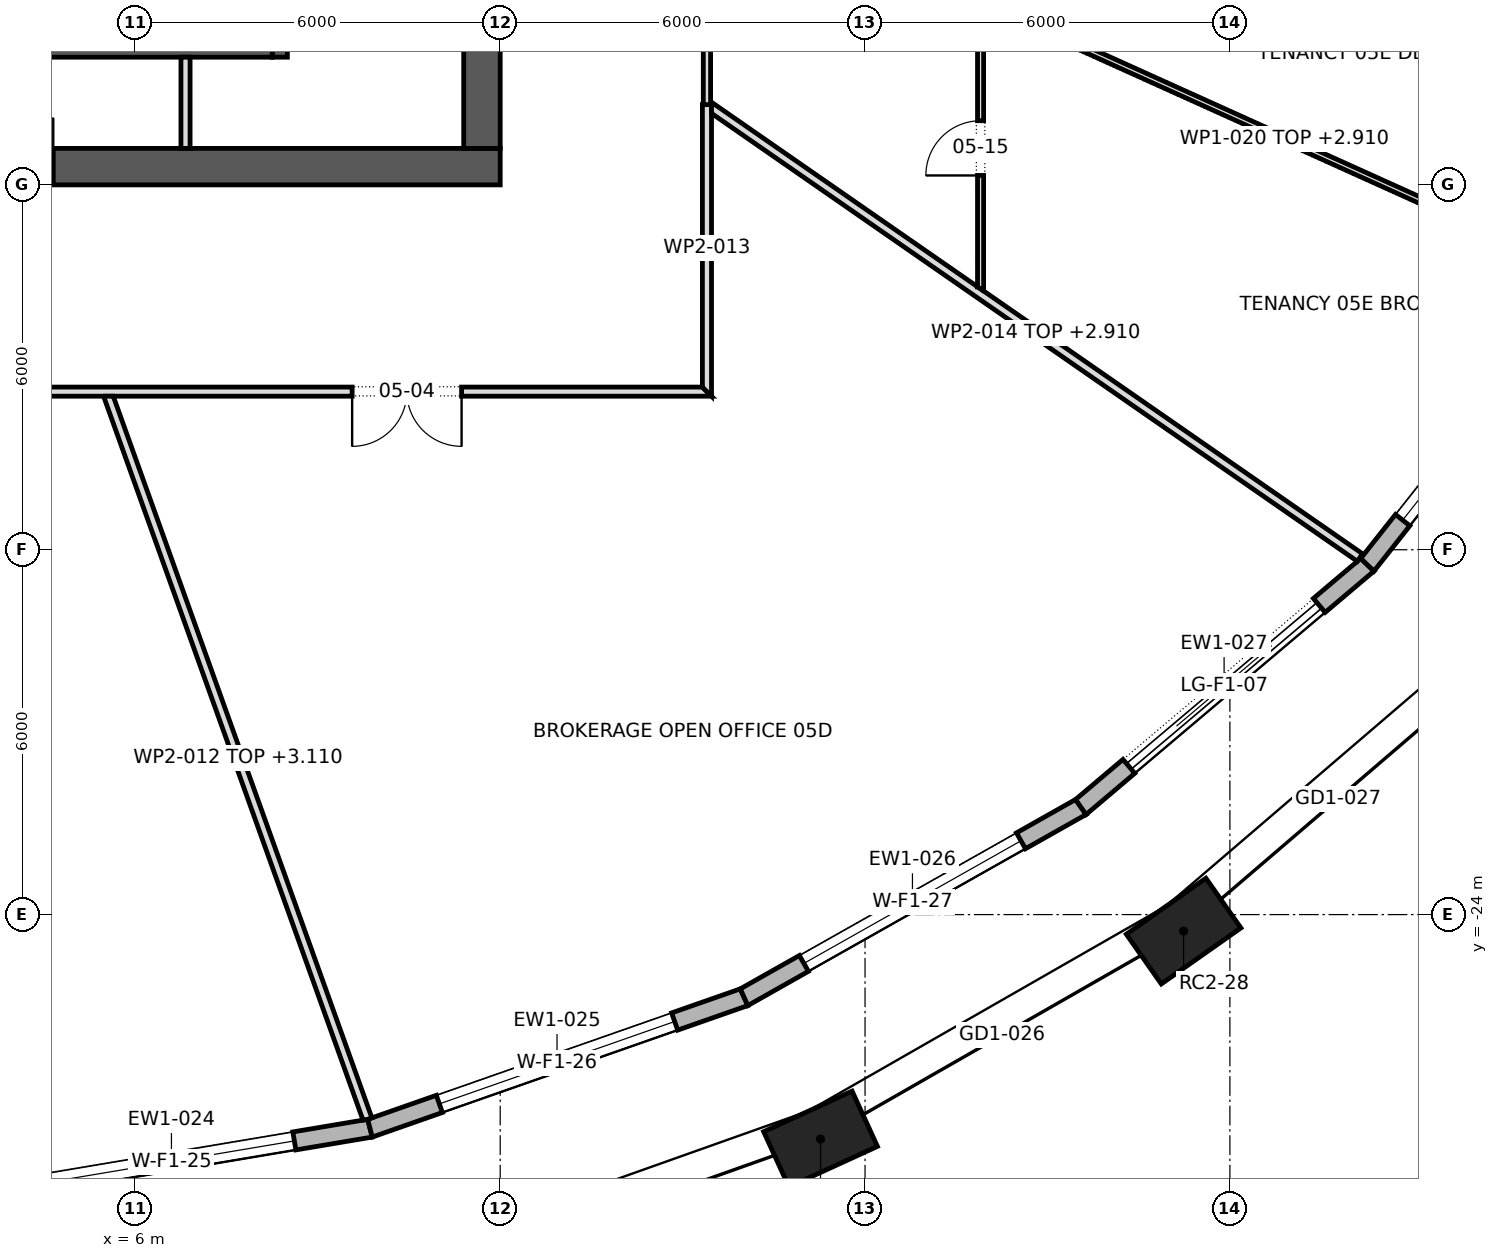
"""IFC4 building model, lengths in metres.
Left out: names, types, materials, properties, quantities, classifications, styles, units other than length and angle.
Written with IfcOpenShell. Run it as: python <this file> out.ifc"""

import sys

from ifc_helpers import new_model, si_unit, direction, frame, frame_2d, origin, origin_2d, place, context, subcontext, project, spatial, polyline, rectangle, outline, extrude, element, fill, save


model = new_model("IFC4")
c1 = context("Model", 3, precision=1e-05, world=origin(), true_north=direction((0.0, 1.0)))
c2 = subcontext(c1, "Body", "Model", "MODEL_VIEW")
j1 = project(units=[si_unit("LENGTHUNIT", "METRE"), si_unit("PLANEANGLEUNIT", "RADIAN")], contexts=[c1])
p1 = place(None, origin())
s1 = spatial("IfcSite", under=j1, at=p1, CompositionType="ELEMENT")
p2 = place(p1, origin())
s2 = spatial("IfcBuilding", under=s1, at=p2, CompositionType="ELEMENT")
p3 = place(p2, frame((0.0, 0.0, 73.9)))
s3 = spatial("IfcBuildingStorey", under=s2, at=p3, CompositionType="ELEMENT", Elevation=73.9)
for number, where, z_axis, x_axis in (
    (1, (17.268, -27.691, 0.0), (0.0, 0.0, 1.0), (0.909, 0.417, 0.0)),
    (2, (23.239, -24.271, 0.0), (0.0, 0.0, 1.0), (0.818, 0.575, 0.0)),
):
    element("IfcColumn", number, at=place(p3, frame(where, z_axis=z_axis, x_axis=x_axis)), inside=s3, PredefinedType="COLUMN", context=c2, shape_type="SweptSolid", body=[
        extrude(rectangle(XDim=1.6, YDim=1.0, at=origin_2d()), origin(), (0.0, 0.0, 1.0), 4.2),
    ])
p4 = place(p3, frame((-12.0, -11.7, 0.0), z_axis=(0.0, 0.0, 1.0), x_axis=(1.0, 0.0, 0.0)))
e3 = element("IfcWall", 3, at=p4, inside=s3, PredefinedType="SHEAR", context=c2, shape_type="SweptSolid", body=[
    extrude(rectangle(XDim=24.0, YDim=0.6, at=frame_2d((12.0, 0.0))), origin(), (0.0, 0.0, 1.0), 4.2),
])
p5 = place(p4, frame((9.975, 0.0, 0.0)))
e4 = element("IfcOpeningElement", 4, at=p5, cuts=e3, PredefinedType="OPENING", context=c2, shape_type="SweptSolid", body=[
    extrude(rectangle(XDim=0.9, YDim=2.1, at=frame_2d((0.45, 1.05))), frame((0.0, 0.312, 0.0), z_axis=(0.0, -1.0, 0.0), x_axis=(1.0, 0.0, 0.0)), (0.0, 0.0, 1.0), 0.624),
])
p6 = place(p4, frame((4.6, 0.0, 0.0)))
e5 = element("IfcOpeningElement", 5, at=p6, cuts=e3, PredefinedType="OPENING", context=c2, shape_type="SweptSolid", body=[
    extrude(rectangle(XDim=0.8, YDim=2.1, at=frame_2d((0.4, 1.05))), frame((0.0, 0.312, 0.0), z_axis=(0.0, -1.0, 0.0), x_axis=(1.0, 0.0, 0.0)), (0.0, 0.0, 1.0), 0.624),
])
p7 = place(p4, frame((7.0, 0.0, 0.0)))
e6 = element("IfcOpeningElement", 6, at=p7, cuts=e3, PredefinedType="OPENING", context=c2, shape_type="SweptSolid", body=[
    extrude(rectangle(XDim=0.8, YDim=2.1, at=frame_2d((0.4, 1.05))), frame((0.0, 0.312, 0.0), z_axis=(0.0, -1.0, 0.0), x_axis=(1.0, 0.0, 0.0)), (0.0, 0.0, 1.0), 0.624),
])
p8 = place(p4, frame((15.85, 0.0, 0.0)))
e7 = element("IfcOpeningElement", 7, at=p8, cuts=e3, PredefinedType="OPENING", context=c2, shape_type="SweptSolid", body=[
    extrude(rectangle(XDim=0.8, YDim=2.1, at=frame_2d((0.4, 1.05))), frame((0.0, 0.312, 0.0), z_axis=(0.0, -1.0, 0.0), x_axis=(1.0, 0.0, 0.0)), (0.0, 0.0, 1.0), 0.624),
])
p9 = place(p3, frame((11.7, -11.4, 0.0), z_axis=(0.0, 0.0, 1.0), x_axis=(0.0, 1.0, 0.0)))
e8 = element("IfcWall", 8, at=p9, inside=s3, PredefinedType="SHEAR", context=c2, shape_type="SweptSolid", body=[
    extrude(rectangle(XDim=22.8, YDim=0.6, at=frame_2d((11.4, 0.0))), origin(), (0.0, 0.0, 1.0), 4.2),
])
p10 = place(p9, frame((10.2, 0.0, 0.0)))
e9 = element("IfcOpeningElement", 9, at=p10, cuts=e8, PredefinedType="OPENING", context=c2, shape_type="SweptSolid", body=[
    extrude(rectangle(XDim=2.4, YDim=2.1, at=frame_2d((1.2, 1.05))), frame((0.0, 0.312, 0.0), z_axis=(0.0, -1.0, 0.0), x_axis=(1.0, 0.0, 0.0)), (0.0, 0.0, 1.0), 0.624),
])
p11 = place(p9, frame((19.5, 0.0, 0.0)))
e10 = element("IfcOpeningElement", 10, at=p11, cuts=e8, PredefinedType="OPENING", context=c2, shape_type="SweptSolid", body=[
    extrude(rectangle(XDim=1.2, YDim=2.1, at=frame_2d((0.6, 1.05))), frame((0.0, 0.312, 0.0), z_axis=(0.0, -1.0, 0.0), x_axis=(1.0, 0.0, 0.0)), (0.0, 0.0, 1.0), 0.624),
])
p12 = place(p9, frame((2.1, 0.0, 0.0)))
e11 = element("IfcOpeningElement", 11, at=p12, cuts=e8, PredefinedType="OPENING", context=c2, shape_type="SweptSolid", body=[
    extrude(rectangle(XDim=1.2, YDim=2.1, at=frame_2d((0.6, 1.05))), frame((0.0, 0.312, 0.0), z_axis=(0.0, -1.0, 0.0), x_axis=(1.0, 0.0, 0.0)), (0.0, 0.0, 1.0), 0.624),
])
p13 = place(p3, frame((3.329, -28.611, 0.0), z_axis=(0.0, 0.0, 1.0), x_axis=(0.986157735925, 0.165809890767, 0.0)))
e12 = element("IfcWall", 12, at=p13, inside=s3, PredefinedType="STANDARD", context=c2, shape_type="SweptSolid", body=[
    extrude(outline(polyline([(-0.012, -0.15), (6.634, -0.15), (6.609, 0.15), (0.012, 0.15), (-0.012, -0.15)])), origin(), (0.0, 0.0, 1.0), 3.9),
])
p14 = place(p13, frame((1.261, 0.0, 0.6)))
e13 = element("IfcOpeningElement", 13, at=p14, cuts=e12, PredefinedType="OPENING", context=c2, shape_type="SweptSolid", body=[
    extrude(rectangle(XDim=4.1, YDim=2.85, at=frame_2d((2.05, 1.425))), frame((0.0, 0.162, 0.0), z_axis=(0.0, -1.0, 0.0), x_axis=(1.0, 0.0, 0.0)), (0.0, 0.0, 1.0), 0.324),
])
p15 = place(p3, frame((9.858, -27.513, 0.0), z_axis=(0.0, 0.0, 1.0), x_axis=(0.943815136299, 0.330473884736, 0.0)))
e14 = element("IfcWall", 14, at=p15, inside=s3, PredefinedType="STANDARD", context=c2, shape_type="SweptSolid", body=[
    extrude(outline(polyline([(-0.013, -0.15), (6.531, -0.15), (6.505, 0.15), (0.013, 0.15), (-0.013, -0.15)])), origin(), (0.0, 0.0, 1.0), 3.9),
])
p16 = place(p15, frame((1.209, 0.0, 0.6)))
e15 = element("IfcOpeningElement", 15, at=p16, cuts=e14, PredefinedType="OPENING", context=c2, shape_type="SweptSolid", body=[
    extrude(rectangle(XDim=4.1, YDim=2.85, at=frame_2d((2.05, 1.425))), frame((0.0, 0.162, 0.0), z_axis=(0.0, -1.0, 0.0), x_axis=(1.0, 0.0, 0.0)), (0.0, 0.0, 1.0), 0.324),
])
p17 = place(p3, frame((16.01, -25.359, 0.0), z_axis=(0.0, 0.0, 1.0), x_axis=(0.870710061474, 0.491796694629, 0.0)))
e16 = element("IfcWall", 16, at=p17, inside=s3, PredefinedType="STANDARD", context=c2, shape_type="SweptSolid", body=[
    extrude(outline(polyline([(-0.013, -0.15), (6.375, -0.15), (6.346, 0.15), (0.013, 0.15), (-0.013, -0.15)])), origin(), (0.0, 0.0, 1.0), 3.9),
])
p18 = place(p17, frame((1.13, 0.0, 0.6)))
e17 = element("IfcOpeningElement", 17, at=p18, cuts=e16, PredefinedType="OPENING", context=c2, shape_type="SweptSolid", body=[
    extrude(rectangle(XDim=4.1, YDim=2.85, at=frame_2d((2.05, 1.425))), frame((0.0, 0.162, 0.0), z_axis=(0.0, -1.0, 0.0), x_axis=(1.0, 0.0, 0.0)), (0.0, 0.0, 1.0), 0.324),
])
p19 = place(p3, frame((21.549, -22.231, 0.0), z_axis=(0.0, 0.0, 1.0), x_axis=(0.763693886759, 0.645578536916, 0.0)))
e18 = element("IfcWall", 18, at=p19, inside=s3, PredefinedType="STANDARD", context=c2, shape_type="SweptSolid", body=[
    extrude(outline(polyline([(-0.014, -0.15), (6.185, -0.15), (6.155, 0.15), (0.014, 0.15), (-0.014, -0.15)])), origin(), (0.0, 0.0, 1.0), 3.9),
])
p20 = place(p19, frame((1.035, 0.0, 0.0)))
e19 = element("IfcOpeningElement", 19, at=p20, cuts=e18, PredefinedType="OPENING", context=c2, shape_type="SweptSolid", body=[
    extrude(rectangle(XDim=4.1, YDim=3.45, at=frame_2d((2.05, 1.725))), frame((0.0, 0.162, 0.0), z_axis=(0.0, -1.0, 0.0), x_axis=(1.0, 0.0, 0.0)), (0.0, 0.0, 1.0), 0.324),
])
p21 = place(p3, frame((26.26, -18.248, 0.0), z_axis=(0.0, 0.0, 1.0), x_axis=(0.620093447965, 0.784527957303, 0.0)))
e20 = element("IfcWall", 20, at=p21, inside=s3, PredefinedType="STANDARD", context=c2, shape_type="SweptSolid", body=[
    extrude(outline(polyline([(-0.015, -0.15), (5.989, -0.15), (5.957, 0.15), (0.015, 0.15), (-0.015, -0.15)])), origin(), (0.0, 0.0, 1.0), 3.9),
])
p22 = place(p21, frame((0.937, 0.0, 0.6)))
e21 = element("IfcOpeningElement", 21, at=p22, cuts=e20, PredefinedType="OPENING", context=c2, shape_type="SweptSolid", body=[
    extrude(rectangle(XDim=4.1, YDim=2.85, at=frame_2d((2.05, 1.425))), frame((0.0, 0.162, 0.0), z_axis=(0.0, -1.0, 0.0), x_axis=(1.0, 0.0, 0.0)), (0.0, 0.0, 1.0), 0.324),
])
p23 = place(p3, frame((8.375, -9.9, 0.0), z_axis=(0.0, 0.0, 1.0), x_axis=(0.0, 1.0, 0.0)))
e22 = element("IfcWall", 22, at=p23, inside=s3, PredefinedType="SHEAR", context=c2, shape_type="SweptSolid", body=[
    extrude(rectangle(XDim=3.4, YDim=0.25, at=frame_2d((1.7, 0.0))), origin(), (0.0, 0.0, 1.0), 3.9),
])
p24 = place(p23, frame((1.175, 0.0, 0.0)))
e23 = element("IfcOpeningElement", 23, at=p24, cuts=e22, PredefinedType="OPENING", context=c2, shape_type="SweptSolid", body=[
    extrude(rectangle(XDim=1.2, YDim=2.1, at=frame_2d((0.6, 1.05))), frame((0.0, 0.137, 0.0), z_axis=(0.0, -1.0, 0.0), x_axis=(1.0, 0.0, 0.0)), (0.0, 0.0, 1.0), 0.274),
])
p25 = place(p3, frame((0.25, -9.825, 0.0), z_axis=(0.0, 0.0, 1.0), x_axis=(1.0, 0.0, 0.0)))
e24 = element("IfcWall", 24, at=p25, inside=s3, PredefinedType="SHEAR", context=c2, shape_type="SweptSolid", body=[
    extrude(rectangle(XDim=8.0, YDim=0.15, at=frame_2d((4.0, 0.0))), origin(), (0.0, 0.0, 1.0), 3.9),
])
p26 = place(p3, frame((6.825, -11.4, 0.0), z_axis=(0.0, 0.0, 1.0), x_axis=(0.0, 1.0, 0.0)))
e25 = element("IfcWall", 25, at=p26, inside=s3, PredefinedType="PARTITIONING", context=c2, shape_type="SweptSolid", body=[
    extrude(rectangle(XDim=1.5, YDim=0.15, at=frame_2d((0.75, 0.0))), origin(), (0.0, 0.0, 1.0), 3.9),
])
p27 = place(p3, frame((-15.475, -15.4, 0.0), z_axis=(0.0, 0.0, 1.0), x_axis=(1.0, 0.0, 0.0)))
e26 = element("IfcWall", 26, at=p27, inside=s3, PredefinedType="PARTITIONING", context=c2, shape_type="SweptSolid", body=[
    extrude(outline(polyline([(0.0, -0.075), (1.935, -0.075), (3.869, -0.075), (5.803, -0.075), (7.738, -0.075), (9.672, -0.075), (11.606, -0.075), (13.541, -0.075), (15.475, -0.075), (17.409, -0.075), (19.344, -0.075), (21.278, -0.075), (23.212, -0.075), (25.147, -0.075), (27.081, -0.075), (29.016, -0.075), (30.95, -0.075), (30.8, 0.075), (28.885, 0.075), (26.969, 0.075), (25.053, 0.075), (23.138, 0.075), (21.222, 0.075), (19.306, 0.075), (17.391, 0.075), (15.475, 0.075), (13.56, 0.075), (11.644, 0.075), (9.728, 0.075), (7.812, 0.075), (5.897, 0.075), (3.981, 0.075), (2.066, 0.075), (0.15, 0.075), (0.0, -0.075)])), origin(), (0.0, 0.0, 1.0), 3.9),
])
p28 = place(p27, frame((2.405, 0.0, 0.0)))
e27 = element("IfcOpeningElement", 27, at=p28, cuts=e26, PredefinedType="OPENING", context=c2, shape_type="SweptSolid", body=[
    extrude(rectangle(XDim=1.0, YDim=2.1, at=frame_2d((0.5, 1.05))), frame((0.0, 0.087, 0.0), z_axis=(0.0, -1.0, 0.0), x_axis=(1.0, 0.0, 0.0)), (0.0, 0.0, 1.0), 0.174),
])
p29 = place(p27, frame((12.47, 0.0, 0.0)))
e28 = element("IfcOpeningElement", 28, at=p29, cuts=e26, PredefinedType="OPENING", context=c2, shape_type="SweptSolid", body=[
    extrude(rectangle(XDim=1.8, YDim=2.1, at=frame_2d((0.9, 1.05))), frame((0.0, 0.087, 0.0), z_axis=(0.0, -1.0, 0.0), x_axis=(1.0, 0.0, 0.0)), (0.0, 0.0, 1.0), 0.174),
])
p30 = place(p27, frame((25.04, 0.0, 0.0)))
e29 = element("IfcOpeningElement", 29, at=p30, cuts=e26, PredefinedType="OPENING", context=c2, shape_type="SweptSolid", body=[
    extrude(rectangle(XDim=1.8, YDim=2.1, at=frame_2d((0.9, 1.05))), frame((0.0, 0.087, 0.0), z_axis=(0.0, -1.0, 0.0), x_axis=(1.0, 0.0, 0.0)), (0.0, 0.0, 1.0), 0.174),
])
p31 = place(p3, frame((5.548, -15.45, 0.0), z_axis=(0.0, 0.0, 1.0), x_axis=(0.337357475529, -0.941376616294, 0.0)))
e30 = element("IfcWall", 30, at=p31, inside=s3, PredefinedType="PARTITIONING", context=c2, shape_type="SweptSolid", body=[
    extrude(outline(polyline([(0.0, -0.075), (1.807, -0.075), (3.613, -0.075), (5.42, -0.075), (7.226, -0.075), (9.033, -0.075), (10.84, -0.075), (12.646, -0.075), (12.66, 0.002), (12.66, 0.018), (12.66, 0.075), (10.859, 0.075), (9.058, 0.075), (7.257, 0.075), (5.456, 0.075), (3.655, 0.075), (1.854, 0.075), (0.053, 0.075), (0.0, -0.074), (0.0, -0.075)])), origin(), (0.0, 0.0, 1.0), 3.11),
])
p32 = place(p3, frame((15.4, -10.68, 0.0), z_axis=(0.0, 0.0, 1.0), x_axis=(0.0, -1.0, 0.0)))
e31 = element("IfcWall", 31, at=p32, inside=s3, PredefinedType="PARTITIONING", context=c2, shape_type="SweptSolid", body=[
    extrude(outline(polyline([(0.0, -0.075), (1.548, -0.075), (3.097, -0.075), (4.645, -0.075), (4.795, 0.075), (3.197, 0.075), (1.598, 0.075), (0.0, 0.075), (0.0, -0.075)])), origin(), (0.0, 0.0, 1.0), 3.9),
])
p33 = place(p3, frame((15.418, -10.692, 0.0), z_axis=(0.0, 0.0, 1.0), x_axis=(0.821683258501, -0.569944403166, 0.0)))
e32 = element("IfcWall", 32, at=p33, inside=s3, PredefinedType="PARTITIONING", context=c2, shape_type="SweptSolid", body=[
    extrude(outline(polyline([(13.047, 0.075), (11.122, 0.075), (9.196, 0.075), (7.271, 0.075), (5.346, 0.075), (5.343, 0.073), (5.342, 0.075), (3.562, 0.075), (1.781, 0.075), (0.0, 0.075), (0.0, 0.074), (0.028, 0.034), (0.04, 0.043), (0.122, -0.075), (1.968, -0.075), (3.815, -0.075), (5.661, -0.075), (7.508, -0.075), (9.354, -0.075), (11.2, -0.075), (13.047, -0.075), (13.047, 0.075)])), origin(), (0.0, 0.0, 1.0), 2.91),
])
p34 = place(p3, frame((15.4, -3.89, 0.0), z_axis=(0.0, 0.0, 1.0), x_axis=(0.0, -1.0, 0.0)))
e33 = element("IfcWall", 33, at=p34, inside=s3, PredefinedType="PARTITIONING", context=c2, shape_type="SweptSolid", body=[
    extrude(rectangle(XDim=6.79, YDim=0.12, at=frame_2d((3.395, 0.0))), origin(), (0.0, 0.0, 1.0), 3.9),
])
p35 = place(p34, frame((2.895, 0.0, 0.0)))
e34 = element("IfcOpeningElement", 34, at=p35, cuts=e33, PredefinedType="OPENING", context=c2, shape_type="SweptSolid", body=[
    extrude(rectangle(XDim=1.0, YDim=2.1, at=frame_2d((0.5, 1.05))), frame((0.0, 0.072, 0.0), z_axis=(0.0, -1.0, 0.0), x_axis=(1.0, 0.0, 0.0)), (0.0, 0.0, 1.0), 0.144),
])
p36 = place(p3, frame((19.9, -13.744, 0.0), z_axis=(0.0, 0.0, 1.0), x_axis=(0.0, 1.0, 0.0)))
e35 = element("IfcWall", 35, at=p36, inside=s3, PredefinedType="PARTITIONING", context=c2, shape_type="SweptSolid", body=[
    extrude(outline(polyline([(0.0, -0.05), (1.559, -0.05), (3.118, -0.05), (4.677, -0.05), (4.678, -0.048), (4.683, -0.05), (6.631, -0.05), (8.58, -0.05), (8.58, -0.048), (8.588, -0.05), (10.286, -0.05), (11.985, -0.05), (13.683, -0.05), (15.382, -0.05), (17.081, -0.05), (18.779, -0.05), (18.779, -0.048), (18.754, 0.05), (16.984, 0.05), (15.214, 0.05), (13.444, 0.05), (11.674, 0.05), (9.904, 0.05), (9.904, 0.05), (9.804, 0.05), (9.804, 0.05), (7.857, 0.05), (5.91, 0.05), (3.963, 0.05), (2.016, 0.05), (0.069, 0.05), (0.0, -0.05), (0.0, -0.05)])), origin(), (0.0, 0.0, 1.0), 3.9),
])
p37 = place(p36, frame((12.179, 0.0, 0.0)))
e36 = element("IfcOpeningElement", 36, at=p37, cuts=e35, PredefinedType="OPENING", context=c2, shape_type="SweptSolid", body=[
    extrude(rectangle(XDim=0.9, YDim=2.1, at=frame_2d((0.45, 1.05))), frame((0.0, 0.062, 0.0), z_axis=(0.0, -1.0, 0.0), x_axis=(1.0, 0.0, 0.0)), (0.0, 0.0, 1.0), 0.124),
])
p38 = place(p36, frame((1.899, 0.0, 0.0)))
e37 = element("IfcOpeningElement", 37, at=p38, cuts=e35, PredefinedType="OPENING", context=c2, shape_type="SweptSolid", body=[
    extrude(rectangle(XDim=0.9, YDim=2.1, at=frame_2d((0.45, 1.05))), frame((0.0, 0.062, 0.0), z_axis=(0.0, -1.0, 0.0), x_axis=(1.0, 0.0, 0.0)), (0.0, 0.0, 1.0), 0.124),
])
p39 = place(p3, frame((19.93, -9.003, 0.0), z_axis=(0.0, 0.0, 1.0), x_axis=(0.911407001064, -0.41150610981, 0.0)))
e38 = element("IfcWall", 38, at=p39, inside=s3, PredefinedType="PARTITIONING", context=c2, shape_type="SweptSolid", body=[
    extrude(outline(polyline([(0.045, -0.05), (1.847, -0.05), (3.65, -0.05), (5.453, -0.05), (7.255, -0.05), (9.058, -0.05), (10.861, -0.05), (10.872, -0.004), (10.874, 0.05), (9.062, 0.05), (7.249, 0.05), (5.437, 0.05), (3.625, 0.05), (1.812, 0.05), (0.0, 0.05), (0.0, 0.049), (0.045, -0.05)])), origin(), (0.0, 0.0, 1.0), 2.91),
])
p40 = place(p14, origin())
e39 = element("IfcWindow", 39, at=p40, inside=s3, PartitioningType="TRIPLE_PANEL_VERTICAL", PredefinedType="WINDOW", context=c2, shape_type="SweptSolid", body=[
    extrude(rectangle(XDim=4.1, YDim=2.85, at=frame_2d((2.05, 1.425))), frame((0.0, 0.03, 0.0), z_axis=(0.0, -1.0, 0.0), x_axis=(1.0, 0.0, 0.0)), (0.0, 0.0, 1.0), 0.06),
])
fill(e13, e39)
p41 = place(p16, origin())
e40 = element("IfcWindow", 40, at=p41, inside=s3, PartitioningType="TRIPLE_PANEL_VERTICAL", PredefinedType="WINDOW", context=c2, shape_type="SweptSolid", body=[
    extrude(rectangle(XDim=4.1, YDim=2.85, at=frame_2d((2.05, 1.425))), frame((0.0, 0.03, 0.0), z_axis=(0.0, -1.0, 0.0), x_axis=(1.0, 0.0, 0.0)), (0.0, 0.0, 1.0), 0.06),
])
fill(e15, e40)
p42 = place(p18, origin())
e41 = element("IfcWindow", 41, at=p42, inside=s3, PartitioningType="TRIPLE_PANEL_VERTICAL", PredefinedType="WINDOW", context=c2, shape_type="SweptSolid", body=[
    extrude(rectangle(XDim=4.1, YDim=2.85, at=frame_2d((2.05, 1.425))), frame((0.0, 0.03, 0.0), z_axis=(0.0, -1.0, 0.0), x_axis=(1.0, 0.0, 0.0)), (0.0, 0.0, 1.0), 0.06),
])
fill(e17, e41)
p43 = place(p20, origin())
e42 = element("IfcDoor", 42, at=p43, inside=s3, OperationType="DOUBLE_DOOR_SLIDING", PredefinedType="DOOR", context=c2, shape_type="SweptSolid", body=[
    extrude(rectangle(XDim=4.1, YDim=3.45, at=frame_2d((2.05, 1.725))), frame((0.0, 0.025, 0.0), z_axis=(0.0, -1.0, 0.0), x_axis=(1.0, 0.0, 0.0)), (0.0, 0.0, 1.0), 0.05),
])
fill(e19, e42)
p44 = place(p22, origin())
e43 = element("IfcWindow", 43, at=p44, inside=s3, PartitioningType="TRIPLE_PANEL_VERTICAL", PredefinedType="WINDOW", context=c2, shape_type="SweptSolid", body=[
    extrude(rectangle(XDim=4.1, YDim=2.85, at=frame_2d((2.05, 1.425))), frame((0.0, 0.03, 0.0), z_axis=(0.0, -1.0, 0.0), x_axis=(1.0, 0.0, 0.0)), (0.0, 0.0, 1.0), 0.06),
])
fill(e21, e43)
p45 = place(p8, origin())
e44 = element("IfcDoor", 44, at=p45, inside=s3, OperationType="SINGLE_SWING_LEFT", PredefinedType="DOOR", context=c2, shape_type="SweptSolid", body=[
    extrude(rectangle(XDim=0.8, YDim=2.1, at=frame_2d((0.4, 1.05))), frame((0.0, 0.025, 0.0), z_axis=(0.0, -1.0, 0.0), x_axis=(1.0, 0.0, 0.0)), (0.0, 0.0, 1.0), 0.05),
])
fill(e7, e44)
p46 = place(p30, frame((1.8, 0.0, 0.0), z_axis=(0.0, 0.0, 1.0), x_axis=(-1.0, 0.0, 0.0)))
e45 = element("IfcDoor", 45, at=p46, inside=s3, OperationType="DOUBLE_DOOR_SINGLE_SWING", PredefinedType="DOOR", context=c2, shape_type="SweptSolid", body=[
    extrude(rectangle(XDim=1.8, YDim=2.1, at=frame_2d((0.9, 1.05))), frame((0.0, 0.025, 0.0), z_axis=(0.0, -1.0, 0.0), x_axis=(1.0, 0.0, 0.0)), (0.0, 0.0, 1.0), 0.05),
])
fill(e29, e45)
p47 = place(p38, origin())
e46 = element("IfcDoor", 46, at=p47, inside=s3, OperationType="SINGLE_SWING_RIGHT", PredefinedType="DOOR", context=c2, shape_type="SweptSolid", body=[
    extrude(rectangle(XDim=0.9, YDim=2.1, at=frame_2d((0.45, 1.05))), frame((0.0, 0.025, 0.0), z_axis=(0.0, -1.0, 0.0), x_axis=(1.0, 0.0, 0.0)), (0.0, 0.0, 1.0), 0.05),
])
fill(e37, e46)
save(model, sys.argv[1])
